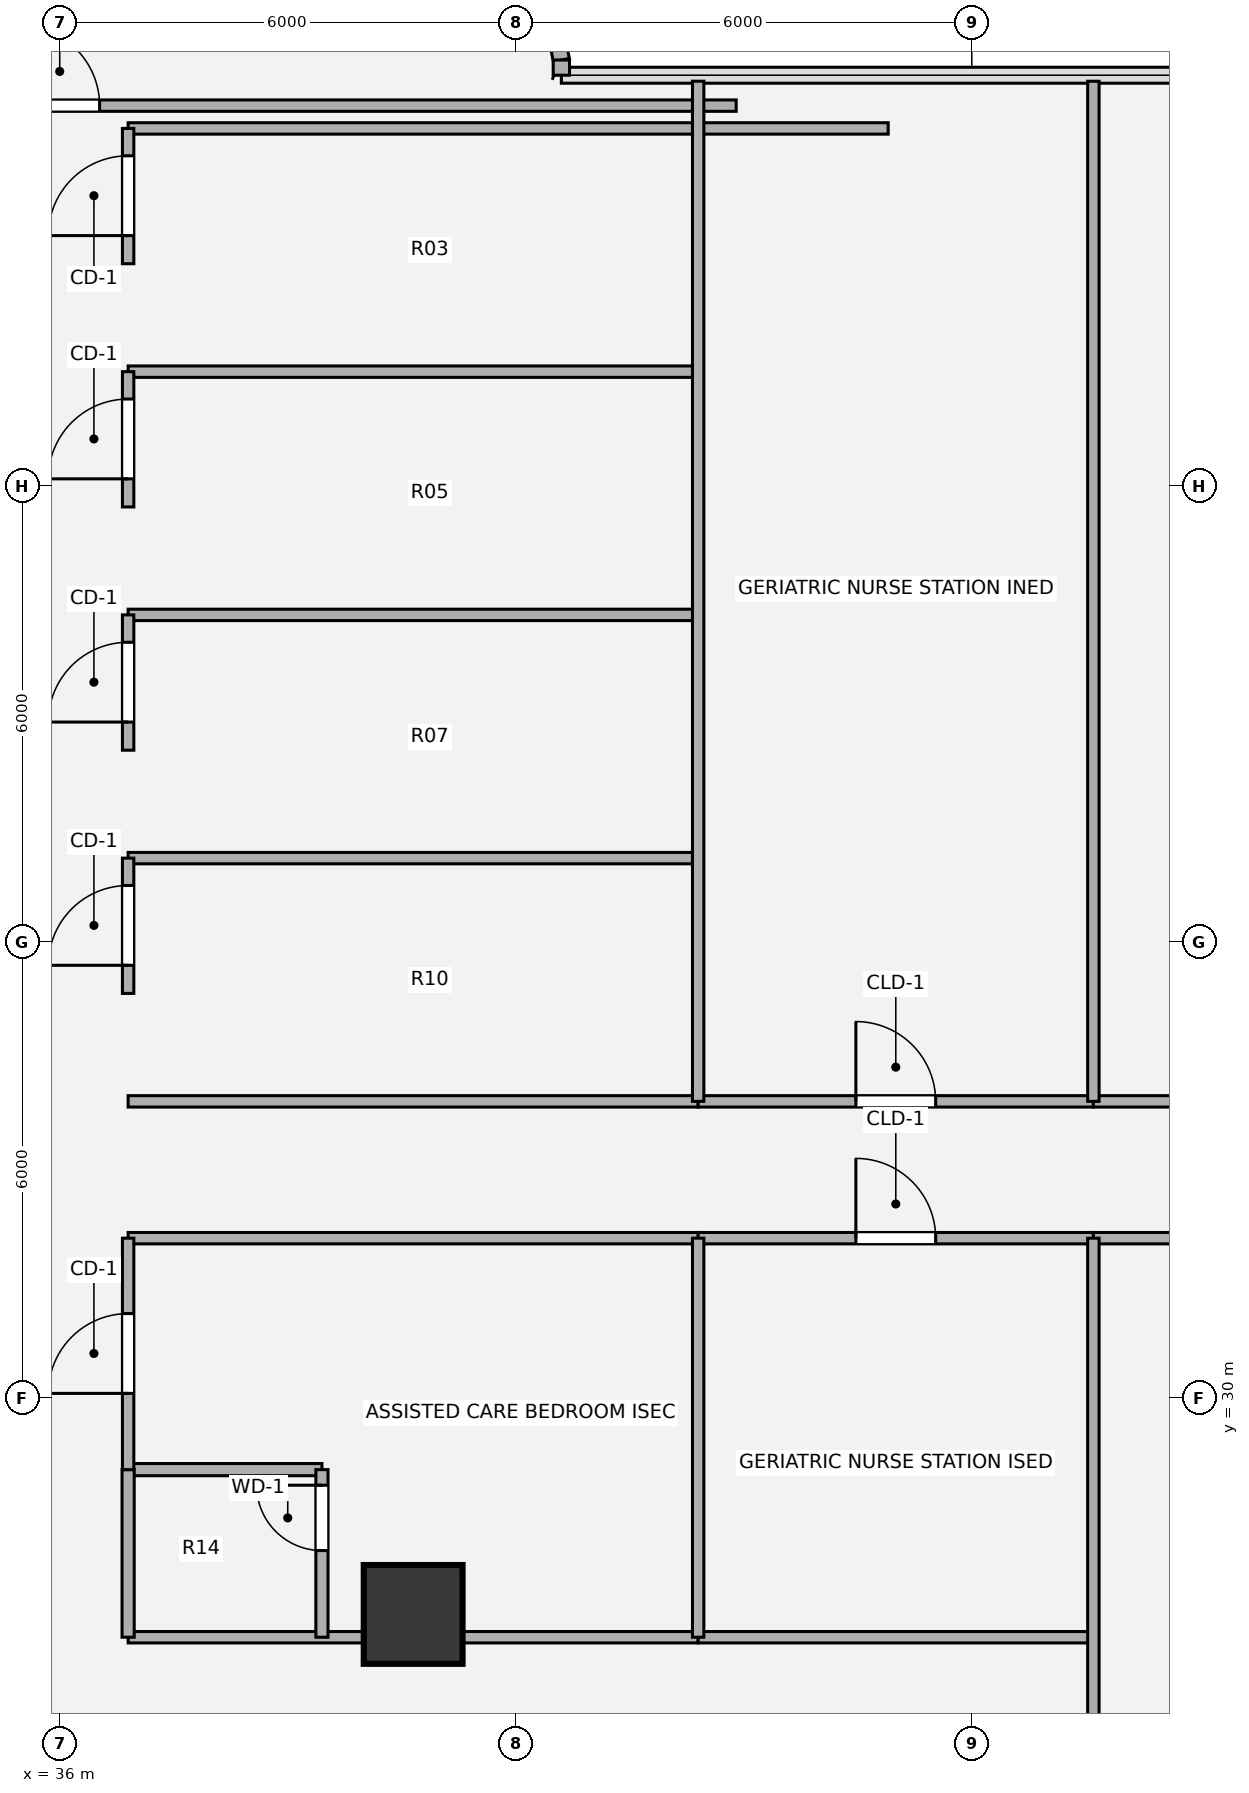
"""IFC4 building model, lengths in metres.
Left out: names, types, materials, properties, quantities, classifications, styles, units other than length and angle.
Written with IfcOpenShell. Run it as: python <this file> out.ifc"""

import sys

from ifc_helpers import new_model, si_unit, direction, frame, frame_2d, origin, origin_2d, place, context, subcontext, project, spatial, rectangle, hollow_circle, extrude, source, transform, mapped, element, fill, save


model = new_model("IFC4")
c1 = context("Model", 3, precision=1e-05, world=origin(), true_north=direction((0.0, 1.0)))
c2 = subcontext(c1, "Body", "Model", "MODEL_VIEW")
j1 = project(units=[si_unit("LENGTHUNIT", "METRE"), si_unit("PLANEANGLEUNIT", "RADIAN")], contexts=[c1])
p1 = place(None, origin())
s1 = spatial("IfcSite", under=j1, at=p1, CompositionType="ELEMENT")
p2 = place(p1, origin())
s2 = spatial("IfcBuilding", under=s1, at=p2, CompositionType="ELEMENT")
p3 = place(p2, frame((0.0, 0.0, 101.16)))
s3 = spatial("IfcBuildingStorey", under=s2, at=p3, CompositionType="ELEMENT", Elevation=101.16)
m1 = source(origin(), c2, "Body", "SweptSolid", [
    extrude(hollow_circle(Radius=0.65, WallThickness=0.045, at=origin_2d()), origin(), (0.0, 0.0, 1.0), 3.78),
])
p4 = place(p3, frame((40.65, 27.15, 0.0), z_axis=(0.0, 0.0, 1.0), x_axis=(1.0, 0.0, 0.0)))
e1 = element("IfcColumn", 1, at=p4, inside=s3, PredefinedType="COLUMN", context=c2, shape_type="MappedRepresentation", body=[
    mapped(m1, transform((0.0, 0.0, 0.0), x_axis=(1.0, 0.0, 0.0), y_axis=(0.0, 1.0, 0.0), z_axis=(0.0, 0.0, 1.0), scale=1.0)),
])
p5 = place(p3, frame((42.387, 48.671, 0.0), z_axis=(0.0, 0.0, 1.0), x_axis=(0.195127417394, -0.980777900945, 0.0)))
e2 = element("IfcWall", 2, at=p5, inside=s3, PredefinedType="SOLIDWALL", context=c2, shape_type="SweptSolid", body=[
    extrude(rectangle(XDim=1.092, YDim=0.215, at=frame_2d((0.546, 0.0))), origin(), (0.0, 0.0, 1.0), 3.53),
])
p6 = place(p3, frame((42.6, 47.6, 0.0), z_axis=(0.0, 0.0, 1.0), x_axis=(0.0, -1.0, 0.0)))
e3 = element("IfcWall", 3, at=p6, inside=s3, PredefinedType="SOLIDWALL", context=c2, shape_type="SweptSolid", body=[
    extrude(rectangle(XDim=0.2, YDim=0.215, at=frame_2d((0.1, 0.0))), origin(), (0.0, 0.0, 1.0), 3.53),
])
p7 = place(p3, frame((36.9, 26.85, 0.0), z_axis=(0.0, 0.0, 1.0), x_axis=(1.0, 0.0, 0.0)))
e4 = element("IfcWall", 4, at=p7, inside=s3, PredefinedType="PARTITIONING", context=c2, shape_type="SweptSolid", body=[
    extrude(rectangle(XDim=7.5, YDim=0.15, at=frame_2d((3.75, 0.0))), origin(), (0.0, 0.0, 1.0), 2.903),
])
p8 = place(p3, frame((44.4, 26.85, 0.0), z_axis=(0.0, 0.0, 1.0), x_axis=(1.0, 0.0, 0.0)))
e5 = element("IfcWall", 5, at=p8, inside=s3, PredefinedType="PARTITIONING", context=c2, shape_type="SweptSolid", body=[
    extrude(rectangle(XDim=5.2, YDim=0.15, at=frame_2d((2.6, 0.0))), origin(), (0.0, 0.0, 1.0), 3.055),
])
p9 = place(p3, frame((36.9, 29.055, 0.0), z_axis=(0.0, 0.0, 1.0), x_axis=(1.0, 0.0, 0.0)))
e6 = element("IfcWall", 6, at=p9, inside=s3, PredefinedType="PLUMBINGWALL", context=c2, shape_type="SweptSolid", body=[
    extrude(rectangle(XDim=2.55, YDim=0.16, at=frame_2d((1.275, 0.0))), origin(), (0.0, 0.0, 1.0), 3.259),
])
p10 = place(p3, frame((36.9, 32.1, 0.0), z_axis=(0.0, 0.0, 1.0), x_axis=(1.0, 0.0, 0.0)))
e7 = element("IfcWall", 7, at=p10, inside=s3, PredefinedType="PARTITIONING", context=c2, shape_type="SweptSolid", body=[
    extrude(rectangle(XDim=7.5, YDim=0.15, at=frame_2d((3.75, 0.0))), origin(), (0.0, 0.0, 1.0), 2.982),
])
p11 = place(p3, frame((44.4, 32.1, 0.0), z_axis=(0.0, 0.0, 1.0), x_axis=(1.0, 0.0, 0.0)))
e8 = element("IfcWall", 8, at=p11, inside=s3, PredefinedType="PARTITIONING", context=c2, shape_type="SweptSolid", body=[
    extrude(rectangle(XDim=5.2, YDim=0.15, at=frame_2d((2.6, 0.0))), origin(), (0.0, 0.0, 1.0), 2.982),
])
p12 = place(p11, frame((2.075, 0.0, 0.0)))
e9 = element("IfcOpeningElement", 9, at=p12, cuts=e8, PredefinedType="OPENING", context=c2, shape_type="SweptSolid", body=[
    extrude(rectangle(XDim=1.05, YDim=2.1, at=origin_2d()), frame((0.525, 0.085, 1.05), z_axis=(0.0, -1.0, 0.0), x_axis=(1.0, 0.0, 0.0)), (0.0, 0.0, 1.0), 0.17),
])
p13 = place(p3, frame((49.6, 32.1, 0.0), z_axis=(0.0, 0.0, 1.0), x_axis=(1.0, 0.0, 0.0)))
e10 = element("IfcWall", 10, at=p13, inside=s3, PredefinedType="PARTITIONING", context=c2, shape_type="SweptSolid", body=[
    extrude(rectangle(XDim=8.42, YDim=0.15, at=frame_2d((4.21, 0.0))), origin(), (0.0, 0.0, 1.0), 2.982),
])
p14 = place(p13, frame((1.375, 0.0, 0.0)))
e11 = element("IfcOpeningElement", 11, at=p14, cuts=e10, PredefinedType="OPENING", context=c2, shape_type="SweptSolid", body=[
    extrude(rectangle(XDim=1.05, YDim=2.1, at=origin_2d()), frame((0.525, 0.085, 1.05), z_axis=(0.0, -1.0, 0.0), x_axis=(1.0, 0.0, 0.0)), (0.0, 0.0, 1.0), 0.17),
])
p15 = place(p3, frame((36.9, 33.9, 0.0), z_axis=(0.0, 0.0, 1.0), x_axis=(1.0, 0.0, 0.0)))
e12 = element("IfcWall", 12, at=p15, inside=s3, PredefinedType="PARTITIONING", context=c2, shape_type="SweptSolid", body=[
    extrude(rectangle(XDim=7.5, YDim=0.15, at=frame_2d((3.75, 0.0))), origin(), (0.0, 0.0, 1.0), 2.982),
])
p16 = place(p3, frame((44.4, 33.9, 0.0), z_axis=(0.0, 0.0, 1.0), x_axis=(1.0, 0.0, 0.0)))
e13 = element("IfcWall", 13, at=p16, inside=s3, PredefinedType="PARTITIONING", context=c2, shape_type="SweptSolid", body=[
    extrude(rectangle(XDim=5.2, YDim=0.15, at=frame_2d((2.6, 0.0))), origin(), (0.0, 0.0, 1.0), 2.982),
])
p17 = place(p16, frame((2.075, 0.0, 0.0)))
e14 = element("IfcOpeningElement", 14, at=p17, cuts=e13, PredefinedType="OPENING", context=c2, shape_type="SweptSolid", body=[
    extrude(rectangle(XDim=1.05, YDim=2.1, at=origin_2d()), frame((0.525, 0.085, 1.05), z_axis=(0.0, -1.0, 0.0), x_axis=(1.0, 0.0, 0.0)), (0.0, 0.0, 1.0), 0.17),
])
p18 = place(p3, frame((49.6, 33.9, 0.0), z_axis=(0.0, 0.0, 1.0), x_axis=(1.0, 0.0, 0.0)))
e15 = element("IfcWall", 15, at=p18, inside=s3, PredefinedType="PARTITIONING", context=c2, shape_type="SweptSolid", body=[
    extrude(rectangle(XDim=8.42, YDim=0.15, at=frame_2d((4.21, 0.0))), origin(), (0.0, 0.0, 1.0), 2.982),
])
p19 = place(p18, frame((1.375, 0.0, 0.0)))
e16 = element("IfcOpeningElement", 16, at=p19, cuts=e15, PredefinedType="OPENING", context=c2, shape_type="SweptSolid", body=[
    extrude(rectangle(XDim=1.05, YDim=2.1, at=origin_2d()), frame((0.525, 0.085, 1.05), z_axis=(0.0, -1.0, 0.0), x_axis=(1.0, 0.0, 0.0)), (0.0, 0.0, 1.0), 0.17),
])
p20 = place(p3, frame((36.9, 37.1, 0.0), z_axis=(0.0, 0.0, 1.0), x_axis=(1.0, 0.0, 0.0)))
e17 = element("IfcWall", 17, at=p20, inside=s3, PredefinedType="PARTITIONING", context=c2, shape_type="SweptSolid", body=[
    extrude(rectangle(XDim=7.5, YDim=0.15, at=frame_2d((3.75, 0.0))), origin(), (0.0, 0.0, 1.0), 2.982),
])
p21 = place(p3, frame((36.9, 40.3, 0.0), z_axis=(0.0, 0.0, 1.0), x_axis=(1.0, 0.0, 0.0)))
e18 = element("IfcWall", 18, at=p21, inside=s3, PredefinedType="PARTITIONING", context=c2, shape_type="SweptSolid", body=[
    extrude(rectangle(XDim=7.5, YDim=0.15, at=frame_2d((3.75, 0.0))), origin(), (0.0, 0.0, 1.0), 3.259),
])
p22 = place(p3, frame((36.9, 43.5, 0.0), z_axis=(0.0, 0.0, 1.0), x_axis=(1.0, 0.0, 0.0)))
e19 = element("IfcWall", 19, at=p22, inside=s3, PredefinedType="PARTITIONING", context=c2, shape_type="SweptSolid", body=[
    extrude(rectangle(XDim=7.5, YDim=0.15, at=frame_2d((3.75, 0.0))), origin(), (0.0, 0.0, 1.0), 3.308),
])
p23 = place(p3, frame((36.9, 46.7, 0.0), z_axis=(0.0, 0.0, 1.0), x_axis=(1.0, 0.0, 0.0)))
e20 = element("IfcWall", 20, at=p23, inside=s3, PredefinedType="PARTITIONING", context=c2, shape_type="SweptSolid", body=[
    extrude(rectangle(XDim=10.0, YDim=0.15, at=frame_2d((5.0, 0.0))), origin(), (0.0, 0.0, 1.0), 3.308),
])
p24 = place(p3, frame((27.1, 47.0, 0.0), z_axis=(0.0, 0.0, 1.0), x_axis=(1.0, 0.0, 0.0)))
e21 = element("IfcWall", 21, at=p24, inside=s3, PredefinedType="PARTITIONING", context=c2, shape_type="SweptSolid", body=[
    extrude(rectangle(XDim=17.8, YDim=0.15, at=frame_2d((8.9, 0.0))), origin(), (0.0, 0.0, 1.0), 3.308),
])
p25 = place(p24, frame((8.375, 0.0, 0.0)))
e22 = element("IfcOpeningElement", 22, at=p25, cuts=e21, PredefinedType="OPENING", context=c2, shape_type="SweptSolid", body=[
    extrude(rectangle(XDim=1.05, YDim=2.1, at=origin_2d()), frame((0.525, 0.085, 1.05), z_axis=(0.0, -1.0, 0.0), x_axis=(1.0, 0.0, 0.0)), (0.0, 0.0, 1.0), 0.17),
])
p26 = place(p3, frame((36.9, 26.85, 0.0), z_axis=(0.0, 0.0, 1.0), x_axis=(0.0, 1.0, 0.0)))
e23 = element("IfcWall", 23, at=p26, inside=s3, PredefinedType="PLUMBINGWALL", context=c2, shape_type="SweptSolid", body=[
    extrude(rectangle(XDim=2.205, YDim=0.16, at=frame_2d((1.103, 0.0))), origin(), (0.0, 0.0, 1.0), 3.5),
])
p27 = place(p3, frame((36.9, 29.055, 0.0), z_axis=(0.0, 0.0, 1.0), x_axis=(0.0, 1.0, 0.0)))
e24 = element("IfcWall", 24, at=p27, inside=s3, PredefinedType="PARTITIONING", context=c2, shape_type="SweptSolid", body=[
    extrude(rectangle(XDim=3.045, YDim=0.15, at=frame_2d((1.522, 0.0))), origin(), (0.0, 0.0, 1.0), 3.5),
])
p28 = place(p27, frame((1.003, 0.0, 0.0)))
e25 = element("IfcOpeningElement", 25, at=p28, cuts=e24, PredefinedType="OPENING", context=c2, shape_type="SweptSolid", body=[
    extrude(rectangle(XDim=1.05, YDim=2.1, at=origin_2d()), frame((0.525, 0.085, 1.05), z_axis=(0.0, -1.0, 0.0), x_axis=(1.0, 0.0, 0.0)), (0.0, 0.0, 1.0), 0.17),
])
p29 = place(p3, frame((36.9, 35.32, 0.0), z_axis=(0.0, 0.0, 1.0), x_axis=(0.0, 1.0, 0.0)))
e26 = element("IfcWall", 26, at=p29, inside=s3, PredefinedType="PARTITIONING", context=c2, shape_type="SweptSolid", body=[
    extrude(rectangle(XDim=1.78, YDim=0.15, at=frame_2d((0.89, 0.0))), origin(), (0.0, 0.0, 1.0), 3.5),
])
p30 = place(p29, frame((0.37, 0.0, 0.0)))
e27 = element("IfcOpeningElement", 27, at=p30, cuts=e26, PredefinedType="OPENING", context=c2, shape_type="SweptSolid", body=[
    extrude(rectangle(XDim=1.05, YDim=2.1, at=origin_2d()), frame((0.525, 0.085, 1.05), z_axis=(0.0, -1.0, 0.0), x_axis=(1.0, 0.0, 0.0)), (0.0, 0.0, 1.0), 0.17),
])
p31 = place(p3, frame((36.9, 38.52, 0.0), z_axis=(0.0, 0.0, 1.0), x_axis=(0.0, 1.0, 0.0)))
e28 = element("IfcWall", 28, at=p31, inside=s3, PredefinedType="PARTITIONING", context=c2, shape_type="SweptSolid", body=[
    extrude(rectangle(XDim=1.78, YDim=0.15, at=frame_2d((0.89, 0.0))), origin(), (0.0, 0.0, 1.0), 3.5),
])
p32 = place(p31, frame((0.37, 0.0, 0.0)))
e29 = element("IfcOpeningElement", 29, at=p32, cuts=e28, PredefinedType="OPENING", context=c2, shape_type="SweptSolid", body=[
    extrude(rectangle(XDim=1.05, YDim=2.1, at=origin_2d()), frame((0.525, 0.085, 1.05), z_axis=(0.0, -1.0, 0.0), x_axis=(1.0, 0.0, 0.0)), (0.0, 0.0, 1.0), 0.17),
])
p33 = place(p3, frame((36.9, 41.72, 0.0), z_axis=(0.0, 0.0, 1.0), x_axis=(0.0, 1.0, 0.0)))
e30 = element("IfcWall", 30, at=p33, inside=s3, PredefinedType="PARTITIONING", context=c2, shape_type="SweptSolid", body=[
    extrude(rectangle(XDim=1.78, YDim=0.15, at=frame_2d((0.89, 0.0))), origin(), (0.0, 0.0, 1.0), 3.5),
])
p34 = place(p33, frame((0.37, 0.0, 0.0)))
e31 = element("IfcOpeningElement", 31, at=p34, cuts=e30, PredefinedType="OPENING", context=c2, shape_type="SweptSolid", body=[
    extrude(rectangle(XDim=1.05, YDim=2.1, at=origin_2d()), frame((0.525, 0.085, 1.05), z_axis=(0.0, -1.0, 0.0), x_axis=(1.0, 0.0, 0.0)), (0.0, 0.0, 1.0), 0.17),
])
p35 = place(p3, frame((36.9, 44.92, 0.0), z_axis=(0.0, 0.0, 1.0), x_axis=(0.0, 1.0, 0.0)))
e32 = element("IfcWall", 32, at=p35, inside=s3, PredefinedType="PARTITIONING", context=c2, shape_type="SweptSolid", body=[
    extrude(rectangle(XDim=1.78, YDim=0.15, at=frame_2d((0.89, 0.0))), origin(), (0.0, 0.0, 1.0), 3.5),
])
p36 = place(p35, frame((0.37, 0.0, 0.0)))
e33 = element("IfcOpeningElement", 33, at=p36, cuts=e32, PredefinedType="OPENING", context=c2, shape_type="SweptSolid", body=[
    extrude(rectangle(XDim=1.05, YDim=2.1, at=origin_2d()), frame((0.525, 0.085, 1.05), z_axis=(0.0, -1.0, 0.0), x_axis=(1.0, 0.0, 0.0)), (0.0, 0.0, 1.0), 0.17),
])
p37 = place(p3, frame((39.45, 26.85, 0.0), z_axis=(0.0, 0.0, 1.0), x_axis=(0.0, 1.0, 0.0)))
e34 = element("IfcWall", 34, at=p37, inside=s3, PredefinedType="PLUMBINGWALL", context=c2, shape_type="SweptSolid", body=[
    extrude(rectangle(XDim=2.205, YDim=0.16, at=frame_2d((1.103, 0.0))), origin(), (0.0, 0.0, 1.0), 3.5),
])
p38 = place(p37, frame((1.14, 0.0, 0.0)))
e35 = element("IfcOpeningElement", 35, at=p38, cuts=e34, PredefinedType="OPENING", context=c2, shape_type="SweptSolid", body=[
    extrude(rectangle(XDim=0.86, YDim=2.1, at=origin_2d()), frame((0.43, 0.09, 1.05), z_axis=(0.0, -1.0, 0.0), x_axis=(1.0, 0.0, 0.0)), (0.0, 0.0, 1.0), 0.18),
])
p39 = place(p3, frame((44.4, 26.85, 0.0), z_axis=(0.0, 0.0, 1.0), x_axis=(0.0, 1.0, 0.0)))
e36 = element("IfcWall", 36, at=p39, inside=s3, PredefinedType="PARTITIONING", context=c2, shape_type="SweptSolid", body=[
    extrude(rectangle(XDim=5.25, YDim=0.15, at=frame_2d((2.625, 0.0))), origin(), (0.0, 0.0, 1.0), 3.5),
])
p40 = place(p3, frame((44.4, 33.9, 0.0), z_axis=(0.0, 0.0, 1.0), x_axis=(0.0, 1.0, 0.0)))
e37 = element("IfcWall", 37, at=p40, inside=s3, PredefinedType="PARTITIONING", context=c2, shape_type="SweptSolid", body=[
    extrude(rectangle(XDim=13.421, YDim=0.15, at=frame_2d((6.711, 0.0))), origin(), (0.0, 0.0, 1.0), 3.5),
])
p41 = place(p3, frame((49.6, 25.4, 0.0), z_axis=(0.0, 0.0, 1.0), x_axis=(0.0, 1.0, 0.0)))
e38 = element("IfcWall", 38, at=p41, inside=s3, PredefinedType="PARTITIONING", context=c2, shape_type="SweptSolid", body=[
    extrude(rectangle(XDim=6.7, YDim=0.15, at=frame_2d((3.35, 0.0))), origin(), (0.0, 0.0, 1.0), 3.5),
])
p42 = place(p3, frame((49.6, 33.9, 0.0), z_axis=(0.0, 0.0, 1.0), x_axis=(0.0, 1.0, 0.0)))
e39 = element("IfcWall", 39, at=p42, inside=s3, PredefinedType="PARTITIONING", context=c2, shape_type="SweptSolid", body=[
    extrude(rectangle(XDim=13.421, YDim=0.15, at=frame_2d((6.71, 0.0))), origin(), (0.0, 0.0, 1.0), 3.5),
])
m2 = source(origin(), c2, "Body", "SweptSolid", [
    extrude(rectangle(XDim=1.05, YDim=2.1, at=origin_2d()), frame((0.525, 0.025, 1.05), z_axis=(0.0, -1.0, 0.0), x_axis=(1.0, 0.0, 0.0)), (0.0, 0.0, 1.0), 0.05),
])
p43 = place(p12, origin())
e40 = element("IfcDoor", 40, at=p43, inside=s3, OperationType="SINGLE_SWING_LEFT", PredefinedType="DOOR", context=c2, shape_type="MappedRepresentation", body=[
    mapped(m2, transform((0.0, 0.0, 0.0), x_axis=(1.0, 0.0, 0.0), y_axis=(0.0, 1.0, 0.0), z_axis=(0.0, 0.0, 1.0), scale=1.0)),
])
fill(e9, e40)
p44 = place(p17, origin())
e41 = element("IfcDoor", 41, at=p44, inside=s3, OperationType="SINGLE_SWING_LEFT", PredefinedType="DOOR", context=c2, shape_type="MappedRepresentation", body=[
    mapped(m2, transform((0.0, 0.0, 0.0), x_axis=(1.0, 0.0, 0.0), y_axis=(0.0, 1.0, 0.0), z_axis=(0.0, 0.0, 1.0), scale=1.0)),
])
fill(e14, e41)
p45 = place(p25, origin())
e42 = element("IfcDoor", 42, at=p45, inside=s3, OperationType="SINGLE_SWING_LEFT", PredefinedType="DOOR", context=c2, shape_type="MappedRepresentation", body=[
    mapped(m2, transform((0.0, 0.0, 0.0), x_axis=(1.0, 0.0, 0.0), y_axis=(0.0, 1.0, 0.0), z_axis=(0.0, 0.0, 1.0), scale=1.0)),
])
fill(e22, e42)
m3 = source(origin(), c2, "Body", "SweptSolid", [
    extrude(rectangle(XDim=1.05, YDim=2.1, at=origin_2d()), frame((0.525, 0.025, 1.05), z_axis=(0.0, -1.0, 0.0), x_axis=(1.0, 0.0, 0.0)), (0.0, 0.0, 1.0), 0.05),
])
p46 = place(p28, origin())
e43 = element("IfcDoor", 43, at=p46, inside=s3, OperationType="SINGLE_SWING_LEFT", PredefinedType="DOOR", context=c2, shape_type="MappedRepresentation", body=[
    mapped(m3, transform((0.0, 0.0, 0.0), x_axis=(1.0, 0.0, 0.0), y_axis=(0.0, 1.0, 0.0), z_axis=(0.0, 0.0, 1.0), scale=1.0)),
])
fill(e25, e43)
p47 = place(p30, origin())
e44 = element("IfcDoor", 44, at=p47, inside=s3, OperationType="SINGLE_SWING_LEFT", PredefinedType="DOOR", context=c2, shape_type="MappedRepresentation", body=[
    mapped(m3, transform((0.0, 0.0, 0.0), x_axis=(1.0, 0.0, 0.0), y_axis=(0.0, 1.0, 0.0), z_axis=(0.0, 0.0, 1.0), scale=1.0)),
])
fill(e27, e44)
p48 = place(p32, origin())
e45 = element("IfcDoor", 45, at=p48, inside=s3, OperationType="SINGLE_SWING_LEFT", PredefinedType="DOOR", context=c2, shape_type="MappedRepresentation", body=[
    mapped(m3, transform((0.0, 0.0, 0.0), x_axis=(1.0, 0.0, 0.0), y_axis=(0.0, 1.0, 0.0), z_axis=(0.0, 0.0, 1.0), scale=1.0)),
])
fill(e29, e45)
p49 = place(p34, origin())
e46 = element("IfcDoor", 46, at=p49, inside=s3, OperationType="SINGLE_SWING_LEFT", PredefinedType="DOOR", context=c2, shape_type="MappedRepresentation", body=[
    mapped(m3, transform((0.0, 0.0, 0.0), x_axis=(1.0, 0.0, 0.0), y_axis=(0.0, 1.0, 0.0), z_axis=(0.0, 0.0, 1.0), scale=1.0)),
])
fill(e31, e46)
p50 = place(p36, origin())
e47 = element("IfcDoor", 47, at=p50, inside=s3, OperationType="SINGLE_SWING_LEFT", PredefinedType="DOOR", context=c2, shape_type="MappedRepresentation", body=[
    mapped(m3, transform((0.0, 0.0, 0.0), x_axis=(1.0, 0.0, 0.0), y_axis=(0.0, 1.0, 0.0), z_axis=(0.0, 0.0, 1.0), scale=1.0)),
])
fill(e33, e47)
m4 = source(origin(), c2, "Body", "SweptSolid", [
    extrude(rectangle(XDim=0.86, YDim=2.1, at=origin_2d()), frame((0.43, 0.025, 1.05), z_axis=(0.0, -1.0, 0.0), x_axis=(1.0, 0.0, 0.0)), (0.0, 0.0, 1.0), 0.05),
])
p51 = place(p38, origin())
e48 = element("IfcDoor", 48, at=p51, inside=s3, OperationType="SINGLE_SWING_RIGHT", PredefinedType="DOOR", context=c2, shape_type="MappedRepresentation", body=[
    mapped(m4, transform((0.0, 0.0, 0.0), x_axis=(1.0, 0.0, 0.0), y_axis=(0.0, 1.0, 0.0), z_axis=(0.0, 0.0, 1.0), scale=1.0)),
])
fill(e35, e48)
save(model, sys.argv[1])
